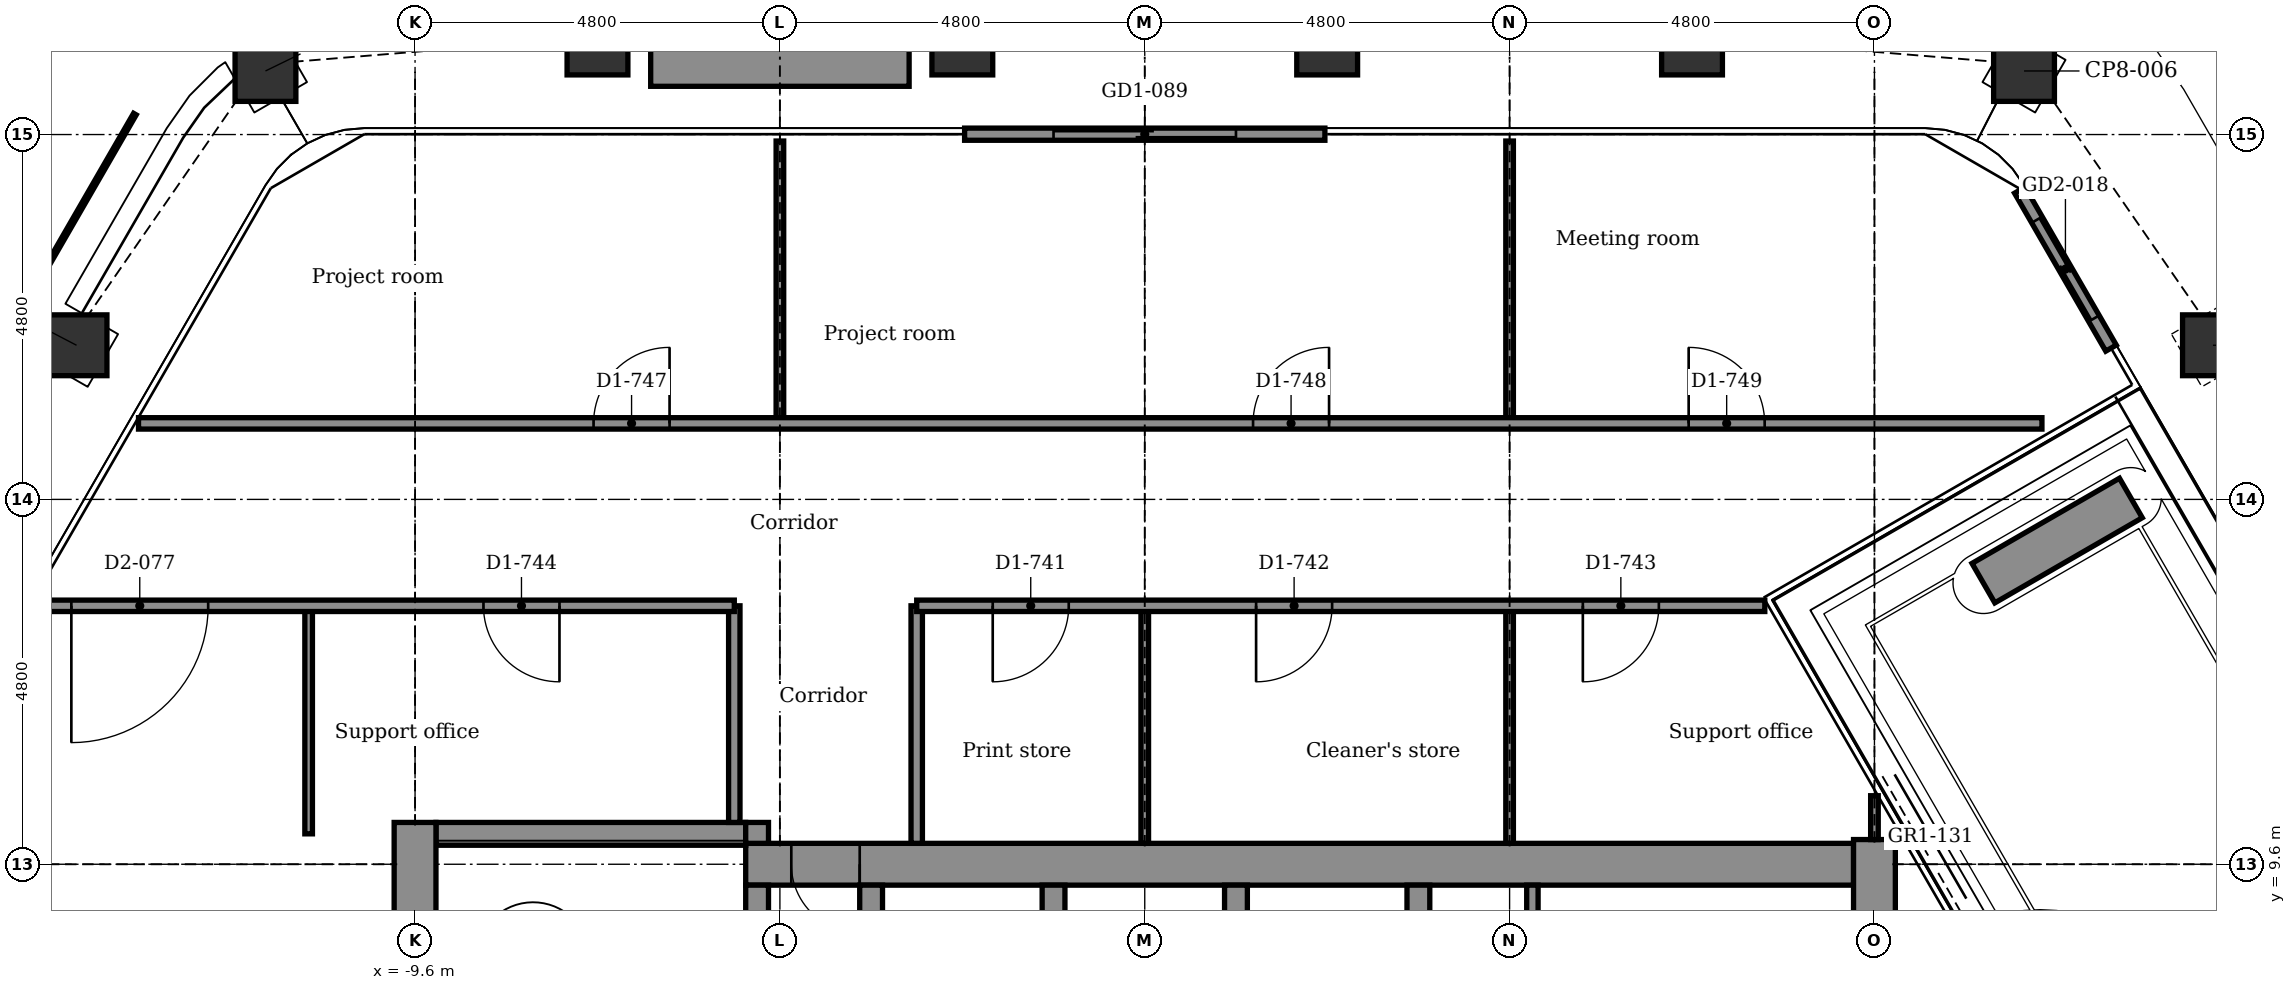
"""IFC4 building model, lengths in metres.
Left out: names, types, materials, properties, quantities, classifications, styles, units other than length and angle.
Written with IfcOpenShell. Run it as: python <this file> out.ifc"""

import sys

from ifc_helpers import new_model, si_unit, direction, frame, frame_2d, origin, origin_2d, place, context, subcontext, project, spatial, rectangle, extrude, element, fill, save


model = new_model("IFC4")
c1 = context("Model", 3, precision=1e-05, world=origin(), true_north=direction((0.0, 1.0)))
c2 = subcontext(c1, "Body", "Model", "MODEL_VIEW")
j1 = project(units=[si_unit("LENGTHUNIT", "METRE"), si_unit("PLANEANGLEUNIT", "RADIAN")], contexts=[c1])
p1 = place(None, origin())
s1 = spatial("IfcSite", under=j1, at=p1, CompositionType="ELEMENT")
p2 = place(p1, origin())
s2 = spatial("IfcBuilding", under=s1, at=p2, CompositionType="ELEMENT")
p3 = place(p2, frame((0.0, 0.0, 285.2)))
s3 = spatial("IfcBuildingStorey", under=s2, at=p3, CompositionType="ELEMENT", Elevation=285.2)
for number, where, z_axis, x_axis in (
    (1, (-11.568, 20.036, -0.15), (0.0, 0.0, 1.0), (0.866, 0.5, 0.0)),
    (2, (-7.2, 20.385, -0.15), (0.0, 0.0, 1.0), (1.0, 0.0, 0.0)),
    (3, (-2.4, 20.385, -0.15), (0.0, 0.0, 1.0), (1.0, 0.0, 0.0)),
    (4, (2.4, 20.385, -0.15), (0.0, 0.0, 1.0), (1.0, 0.0, 0.0)),
    (5, (7.2, 20.385, -0.15), (0.0, 0.0, 1.0), (1.0, 0.0, 0.0)),
    (6, (11.568, 20.036, -0.15), (0.0, 0.0, 1.0), (0.5, 0.866, 0.0)),
    (7, (14.054, 16.428, -0.15), (0.0, 0.0, 1.0), (0.866, 0.5, 0.0)),
    (8, (-14.054, 16.428, -0.15), (0.0, 0.0, 1.0), (0.5, 0.866, 0.0)),
):
    element("IfcColumn", number, at=place(p3, frame(where, z_axis=z_axis, x_axis=x_axis)), inside=s3, PredefinedType="COLUMN", context=c2, shape_type="SweptSolid", body=[
        extrude(rectangle(XDim=0.8, YDim=0.8, at=origin_2d()), origin(), (0.0, 0.0, 1.0), 3.9),
    ])
p4 = place(p3, frame((-5.25, 9.6, -0.15), z_axis=(0.0, 0.0, 1.0), x_axis=(1.0, 0.0, 0.0)))
e9 = element("IfcWall", 9, at=p4, inside=s3, PredefinedType="SHEAR", context=c2, shape_type="SweptSolid", body=[
    extrude(rectangle(XDim=14.575, YDim=0.55, at=frame_2d((7.288, 0.0))), origin(), (0.0, 0.0, 1.0), 3.9),
])
p5 = place(p4, frame((0.6, 0.0, 0.15)))
e10 = element("IfcOpeningElement", 10, at=p5, cuts=e9, PredefinedType="OPENING", context=c2, shape_type="SweptSolid", body=[
    extrude(rectangle(XDim=0.9, YDim=2.1, at=frame_2d((0.45, 1.05))), frame((0.0, 0.285, 0.0), z_axis=(0.0, -1.0, 0.0), x_axis=(1.0, 0.0, 0.0)), (0.0, 0.0, 1.0), 0.57),
])
p6 = place(p3, frame((-9.325, 10.0, -0.15), z_axis=(0.0, 0.0, 1.0), x_axis=(1.0, 0.0, 0.0)))
e11 = element("IfcWall", 11, at=p6, inside=s3, PredefinedType="STANDARD", context=c2, shape_type="SweptSolid", body=[
    extrude(rectangle(XDim=4.075, YDim=0.3, at=frame_2d((2.038, 0.0))), origin(), (0.0, 0.0, 1.0), 3.9),
])
p7 = place(p3, frame((-9.6, 2.55, -0.15), z_axis=(0.0, 0.0, 1.0), x_axis=(0.0, 1.0, 0.0)))
e12 = element("IfcWall", 12, at=p7, inside=s3, PredefinedType="SHEAR", context=c2, shape_type="SweptSolid", body=[
    extrude(rectangle(XDim=7.6, YDim=0.55, at=frame_2d((3.8, 0.0))), origin(), (0.0, 0.0, 1.0), 3.9),
])
p8 = place(p3, frame((-5.1, 2.25, -0.15), z_axis=(0.0, 0.0, 1.0), x_axis=(0.0, 1.0, 0.0)))
e13 = element("IfcWall", 13, at=p8, inside=s3, PredefinedType="STANDARD", context=c2, shape_type="SweptSolid", body=[
    extrude(rectangle(XDim=7.075, YDim=0.3, at=frame_2d((3.538, 0.0))), origin(), (0.0, 0.0, 1.0), 3.9),
])
p9 = place(p8, frame((2.0, 0.0, 0.15)))
e14 = element("IfcOpeningElement", 14, at=p9, cuts=e13, PredefinedType="OPENING", context=c2, shape_type="SweptSolid", body=[
    extrude(rectangle(XDim=1.2, YDim=2.1, at=frame_2d((0.6, 1.05))), frame((0.0, 0.16, 0.0), z_axis=(0.0, -1.0, 0.0), x_axis=(1.0, 0.0, 0.0)), (0.0, 0.0, 1.0), 0.32),
])
p10 = place(p3, frame((-5.1, 9.875, -0.15), z_axis=(0.0, 0.0, 1.0), x_axis=(0.0, 1.0, 0.0)))
e15 = element("IfcWall", 15, at=p10, inside=s3, PredefinedType="STANDARD", context=c2, shape_type="SweptSolid", body=[
    extrude(rectangle(XDim=0.275, YDim=0.3, at=frame_2d((0.137, 0.0))), origin(), (0.0, 0.0, 1.0), 3.9),
])
for number, where, z_axis, x_axis in (
    (16, (-3.6, 5.85, -0.15), (0.0, 0.0, 1.0), (0.0, 1.0, 0.0)),
    (17, (-1.2, 5.85, -0.15), (0.0, 0.0, 1.0), (0.0, 1.0, 0.0)),
    (18, (1.2, 5.85, -0.15), (0.0, 0.0, 1.0), (0.0, 1.0, 0.0)),
    (19, (3.6, 5.85, -0.15), (0.0, 0.0, 1.0), (0.0, 1.0, 0.0)),
):
    element("IfcWall", number, at=place(p3, frame(where, z_axis=z_axis, x_axis=x_axis)), inside=s3, PredefinedType="STANDARD", context=c2, shape_type="SweptSolid", body=[
        extrude(rectangle(XDim=3.475, YDim=0.3, at=frame_2d((1.737, 0.0))), origin(), (0.0, 0.0, 1.0), 3.9),
    ])
p11 = place(p3, frame((9.6, -10.15, -0.15), z_axis=(0.0, 0.0, 1.0), x_axis=(0.0, 1.0, 0.0)))
e20 = element("IfcWall", 20, at=p11, inside=s3, PredefinedType="SHEAR", context=c2, shape_type="SweptSolid", body=[
    extrude(rectangle(XDim=20.075, YDim=0.55, at=frame_2d((10.038, 0.0))), origin(), (0.0, 0.0, 1.0), 3.9),
])
p12 = place(p3, frame((-2.37, 19.205, 0.0), z_axis=(0.0, 0.0, 1.0), x_axis=(1.0, 0.0, 0.0)))
e21 = element("IfcWall", 21, at=p12, inside=s3, PredefinedType="PARTITIONING", context=c2, shape_type="SweptSolid", body=[
    extrude(rectangle(XDim=4.74, YDim=0.16, at=frame_2d((2.37, 0.0))), origin(), (0.0, 0.0, 1.0), 3.75),
])
p13 = place(p12, frame((1.17, 0.0, 0.0)))
e22 = element("IfcOpeningElement", 22, at=p13, cuts=e21, PredefinedType="OPENING", context=c2, shape_type="SweptSolid", body=[
    extrude(rectangle(XDim=2.4, YDim=2.4, at=frame_2d((1.2, 1.2))), frame((0.0, 0.09, 0.0), z_axis=(0.0, -1.0, 0.0), x_axis=(1.0, 0.0, 0.0)), (0.0, 0.0, 1.0), 0.18),
])
p14 = place(p3, frame((11.513, 18.469, 0.0), z_axis=(0.0, 0.0, 1.0), x_axis=(0.499957262057, -0.866050077142, 0.0)))
e23 = element("IfcWall", 23, at=p14, inside=s3, PredefinedType="PARTITIONING", context=c2, shape_type="SweptSolid", body=[
    extrude(rectangle(XDim=2.4, YDim=0.16, at=frame_2d((1.2, 0.0))), origin(), (0.0, 0.0, 1.0), 3.75),
])
p15 = place(p14, frame((0.45, 0.0, 0.0)))
e24 = element("IfcOpeningElement", 24, at=p15, cuts=e23, PredefinedType="OPENING", context=c2, shape_type="SweptSolid", body=[
    extrude(rectangle(XDim=1.5, YDim=2.4, at=frame_2d((0.75, 1.2))), frame((0.0, 0.09, 0.0), z_axis=(0.0, -1.0, 0.0), x_axis=(1.0, 0.0, 0.0)), (0.0, 0.0, 1.0), 0.18),
])
p16 = place(p3, frame((-6.5, 20.135, 0.0), z_axis=(0.0, 0.0, 1.0), x_axis=(1.0, 0.0, 0.0)))
e25 = element("IfcWall", 25, at=p16, inside=s3, PredefinedType="USERDEFINED", context=c2, shape_type="SweptSolid", body=[
    extrude(rectangle(XDim=3.4, YDim=0.6, at=frame_2d((1.7, 0.0))), origin(), (0.0, 0.0, 1.0), 0.7),
])
p17 = place(p3, frame((11.034, 13.298, 0.0), z_axis=(0.0, 0.0, 1.0), x_axis=(0.865980463445, 0.500077830873, 0.0)))
e26 = element("IfcWall", 26, at=p17, inside=s3, PredefinedType="USERDEFINED", context=c2, shape_type="SweptSolid", body=[
    extrude(rectangle(XDim=2.24, YDim=0.6, at=frame_2d((1.12, 0.0))), origin(), (0.0, 0.0, 1.0), 0.7),
])
p18 = place(p3, frame((9.6, 9.925, 0.0), z_axis=(0.0, 0.0, 1.0), x_axis=(0.0, 1.0, 0.0)))
e27 = element("IfcWall", 27, at=p18, inside=s3, PredefinedType="PARTITIONING", context=c2, shape_type="SweptSolid", body=[
    extrude(rectangle(XDim=0.576, YDim=0.1, at=frame_2d((0.288, 0.0))), origin(), (0.0, 0.0, 1.0), 3.217),
])
p19 = place(p3, frame((5.1, 6.0, 0.0), z_axis=(0.0, 0.0, 1.0), x_axis=(0.0, 1.0, 0.0)))
e28 = element("IfcWall", 28, at=p19, inside=s3, PredefinedType="PARTITIONING", context=c2, shape_type="SweptSolid", body=[
    extrude(rectangle(XDim=3.325, YDim=0.15, at=frame_2d((1.663, 0.0))), origin(), (0.0, 0.0, 1.0), 3.75),
])
p20 = place(p19, frame((1.4, 0.0, 0.0)))
e29 = element("IfcOpeningElement", 29, at=p20, cuts=e28, PredefinedType="OPENING", context=c2, shape_type="SweptSolid", body=[
    extrude(rectangle(XDim=0.8, YDim=2.1, at=frame_2d((0.4, 1.05))), frame((0.0, 0.085, 0.0), z_axis=(0.0, -1.0, 0.0), x_axis=(1.0, 0.0, 0.0)), (0.0, 0.0, 1.0), 0.17),
])
p21 = place(p3, frame((4.8, 9.875, 0.0), z_axis=(0.0, 0.0, 1.0), x_axis=(0.0, 1.0, 0.0)))
e30 = element("IfcWall", 30, at=p21, inside=s3, PredefinedType="PARTITIONING", context=c2, shape_type="SweptSolid", body=[
    extrude(rectangle(XDim=3.125, YDim=0.1, at=frame_2d((1.562, 0.0))), origin(), (0.0, 0.0, 1.0), 3.217),
])
p22 = place(p3, frame((4.8, 15.4, 0.0), z_axis=(0.0, 0.0, 1.0), x_axis=(0.0, 1.0, 0.0)))
e31 = element("IfcWall", 31, at=p22, inside=s3, PredefinedType="PARTITIONING", context=c2, shape_type="SweptSolid", body=[
    extrude(rectangle(XDim=3.715, YDim=0.1, at=frame_2d((1.857, 0.0))), origin(), (0.0, 0.0, 1.0), 3.217),
])
p23 = place(p3, frame((0.0, 9.875, 0.0), z_axis=(0.0, 0.0, 1.0), x_axis=(0.0, 1.0, 0.0)))
e32 = element("IfcWall", 32, at=p23, inside=s3, PredefinedType="PARTITIONING", context=c2, shape_type="SweptSolid", body=[
    extrude(rectangle(XDim=3.125, YDim=0.1, at=frame_2d((1.562, 0.0))), origin(), (0.0, 0.0, 1.0), 3.217),
])
p24 = place(p3, frame((-3.0, 9.875, 0.0), z_axis=(0.0, 0.0, 1.0), x_axis=(0.0, 1.0, 0.0)))
e33 = element("IfcWall", 33, at=p24, inside=s3, PredefinedType="PARTITIONING", context=c2, shape_type="SweptSolid", body=[
    extrude(rectangle(XDim=3.125, YDim=0.15, at=frame_2d((1.562, 0.0))), origin(), (0.0, 0.0, 1.0), 3.75),
])
p25 = place(p3, frame((-4.8, 15.4, 0.0), z_axis=(0.0, 0.0, 1.0), x_axis=(0.0, 1.0, 0.0)))
e34 = element("IfcWall", 34, at=p25, inside=s3, PredefinedType="PARTITIONING", context=c2, shape_type="SweptSolid", body=[
    extrude(rectangle(XDim=3.715, YDim=0.1, at=frame_2d((1.857, 0.0))), origin(), (0.0, 0.0, 1.0), 3.217),
])
p26 = place(p3, frame((-5.4, 10.15, 0.0), z_axis=(0.0, 0.0, 1.0), x_axis=(0.0, 1.0, 0.0)))
e35 = element("IfcWall", 35, at=p26, inside=s3, PredefinedType="PARTITIONING", context=c2, shape_type="SweptSolid", body=[
    extrude(rectangle(XDim=2.85, YDim=0.15, at=frame_2d((1.425, 0.0))), origin(), (0.0, 0.0, 1.0), 3.75),
])
p27 = place(p3, frame((-11.0, 10.0, 0.0), z_axis=(0.0, 0.0, 1.0), x_axis=(0.0, 1.0, 0.0)))
e36 = element("IfcWall", 36, at=p27, inside=s3, PredefinedType="PARTITIONING", context=c2, shape_type="SweptSolid", body=[
    extrude(rectangle(XDim=3.0, YDim=0.1, at=frame_2d((1.5, 0.0))), origin(), (0.0, 0.0, 1.0), 3.75),
])
p28 = place(p3, frame((-14.624, 13.0, 0.0), z_axis=(0.0, 0.0, 1.0), x_axis=(1.0, 0.0, 0.0)))
e37 = element("IfcWall", 37, at=p28, inside=s3, PredefinedType="PARTITIONING", context=c2, shape_type="SweptSolid", body=[
    extrude(rectangle(XDim=9.224, YDim=0.15, at=frame_2d((4.612, 0.0))), origin(), (0.0, 0.0, 1.0), 3.75),
])
p29 = place(p28, frame((5.924, 0.0, 0.0)))
e38 = element("IfcOpeningElement", 38, at=p29, cuts=e37, PredefinedType="OPENING", context=c2, shape_type="SweptSolid", body=[
    extrude(rectangle(XDim=1.0, YDim=2.1, at=frame_2d((0.5, 1.05))), frame((0.0, 0.085, 0.0), z_axis=(0.0, -1.0, 0.0), x_axis=(1.0, 0.0, 0.0)), (0.0, 0.0, 1.0), 0.17),
])
p30 = place(p28, frame((0.502, 0.0, 0.0)))
e39 = element("IfcOpeningElement", 39, at=p30, cuts=e37, PredefinedType="OPENING", context=c2, shape_type="SweptSolid", body=[
    extrude(rectangle(XDim=1.8, YDim=2.1, at=frame_2d((0.9, 1.05))), frame((0.0, 0.085, 0.0), z_axis=(0.0, -1.0, 0.0), x_axis=(1.0, 0.0, 0.0)), (0.0, 0.0, 1.0), 0.17),
])
p31 = place(p3, frame((-3.0, 13.0, 0.0), z_axis=(0.0, 0.0, 1.0), x_axis=(1.0, 0.0, 0.0)))
e40 = element("IfcWall", 40, at=p31, inside=s3, PredefinedType="PARTITIONING", context=c2, shape_type="SweptSolid", body=[
    extrude(rectangle(XDim=11.157, YDim=0.15, at=frame_2d((5.579, 0.0))), origin(), (0.0, 0.0, 1.0), 3.75),
])
p32 = place(p31, frame((1.0, 0.0, 0.0)))
e41 = element("IfcOpeningElement", 41, at=p32, cuts=e40, PredefinedType="OPENING", context=c2, shape_type="SweptSolid", body=[
    extrude(rectangle(XDim=1.0, YDim=2.1, at=frame_2d((0.5, 1.05))), frame((0.0, 0.085, 0.0), z_axis=(0.0, -1.0, 0.0), x_axis=(1.0, 0.0, 0.0)), (0.0, 0.0, 1.0), 0.17),
])
p33 = place(p31, frame((4.465, 0.0, 0.0)))
e42 = element("IfcOpeningElement", 42, at=p33, cuts=e40, PredefinedType="OPENING", context=c2, shape_type="SweptSolid", body=[
    extrude(rectangle(XDim=1.0, YDim=2.1, at=frame_2d((0.5, 1.05))), frame((0.0, 0.085, 0.0), z_axis=(0.0, -1.0, 0.0), x_axis=(1.0, 0.0, 0.0)), (0.0, 0.0, 1.0), 0.17),
])
p34 = place(p31, frame((8.764, 0.0, 0.0)))
e43 = element("IfcOpeningElement", 43, at=p34, cuts=e40, PredefinedType="OPENING", context=c2, shape_type="SweptSolid", body=[
    extrude(rectangle(XDim=1.0, YDim=2.1, at=frame_2d((0.5, 1.05))), frame((0.0, 0.085, 0.0), z_axis=(0.0, -1.0, 0.0), x_axis=(1.0, 0.0, 0.0)), (0.0, 0.0, 1.0), 0.17),
])
p35 = place(p3, frame((-13.238, 15.4, 0.0), z_axis=(0.0, 0.0, 1.0), x_axis=(1.0, 0.0, 0.0)))
e44 = element("IfcWall", 44, at=p35, inside=s3, PredefinedType="PARTITIONING", context=c2, shape_type="SweptSolid", body=[
    extrude(rectangle(XDim=25.042, YDim=0.15, at=frame_2d((12.521, 0.0))), origin(), (0.0, 0.0, 1.0), 3.75),
])
p36 = place(p35, frame((5.987, 0.0, 0.0)))
e45 = element("IfcOpeningElement", 45, at=p36, cuts=e44, PredefinedType="OPENING", context=c2, shape_type="SweptSolid", body=[
    extrude(rectangle(XDim=1.0, YDim=2.1, at=frame_2d((0.5, 1.05))), frame((0.0, 0.085, 0.0), z_axis=(0.0, -1.0, 0.0), x_axis=(1.0, 0.0, 0.0)), (0.0, 0.0, 1.0), 0.17),
])
p37 = place(p35, frame((14.663, 0.0, 0.0)))
e46 = element("IfcOpeningElement", 46, at=p37, cuts=e44, PredefinedType="OPENING", context=c2, shape_type="SweptSolid", body=[
    extrude(rectangle(XDim=1.0, YDim=2.1, at=frame_2d((0.5, 1.05))), frame((0.0, 0.085, 0.0), z_axis=(0.0, -1.0, 0.0), x_axis=(1.0, 0.0, 0.0)), (0.0, 0.0, 1.0), 0.17),
])
p38 = place(p35, frame((20.394, 0.0, 0.0)))
e47 = element("IfcOpeningElement", 47, at=p38, cuts=e44, PredefinedType="OPENING", context=c2, shape_type="SweptSolid", body=[
    extrude(rectangle(XDim=1.0, YDim=2.1, at=frame_2d((0.5, 1.05))), frame((0.0, 0.085, 0.0), z_axis=(0.0, -1.0, 0.0), x_axis=(1.0, 0.0, 0.0)), (0.0, 0.0, 1.0), 0.17),
])
p39 = place(p13, origin())
e48 = element("IfcDoor", 48, at=p39, inside=s3, OperationType="DOUBLE_DOOR_SLIDING", PredefinedType="DOOR", context=c2, shape_type="SweptSolid", body=[
    extrude(rectangle(XDim=2.4, YDim=2.4, at=frame_2d((1.2, 1.2))), frame((0.0, 0.025, 0.0), z_axis=(0.0, -1.0, 0.0), x_axis=(1.0, 0.0, 0.0)), (0.0, 0.0, 1.0), 0.05),
])
fill(e22, e48)
p40 = place(p15, origin())
e49 = element("IfcDoor", 49, at=p40, inside=s3, OperationType="DOUBLE_DOOR_SLIDING", PredefinedType="DOOR", context=c2, shape_type="SweptSolid", body=[
    extrude(rectangle(XDim=1.5, YDim=2.4, at=frame_2d((0.75, 1.2))), frame((0.0, 0.025, 0.0), z_axis=(0.0, -1.0, 0.0), x_axis=(1.0, 0.0, 0.0)), (0.0, 0.0, 1.0), 0.05),
])
fill(e24, e49)
p41 = place(p32, frame((1.0, 0.0, 0.0), z_axis=(0.0, 0.0, 1.0), x_axis=(-1.0, 0.0, 0.0)))
e50 = element("IfcDoor", 50, at=p41, inside=s3, OperationType="SINGLE_SWING_LEFT", PredefinedType="DOOR", context=c2, shape_type="SweptSolid", body=[
    extrude(rectangle(XDim=1.0, YDim=2.1, at=frame_2d((0.5, 1.05))), frame((0.0, 0.025, 0.0), z_axis=(0.0, -1.0, 0.0), x_axis=(1.0, 0.0, 0.0)), (0.0, 0.0, 1.0), 0.05),
])
fill(e41, e50)
p42 = place(p33, frame((1.0, 0.0, 0.0), z_axis=(0.0, 0.0, 1.0), x_axis=(-1.0, 0.0, 0.0)))
e51 = element("IfcDoor", 51, at=p42, inside=s3, OperationType="SINGLE_SWING_LEFT", PredefinedType="DOOR", context=c2, shape_type="SweptSolid", body=[
    extrude(rectangle(XDim=1.0, YDim=2.1, at=frame_2d((0.5, 1.05))), frame((0.0, 0.025, 0.0), z_axis=(0.0, -1.0, 0.0), x_axis=(1.0, 0.0, 0.0)), (0.0, 0.0, 1.0), 0.05),
])
fill(e42, e51)
p43 = place(p34, frame((1.0, 0.0, 0.0), z_axis=(0.0, 0.0, 1.0), x_axis=(-1.0, 0.0, 0.0)))
e52 = element("IfcDoor", 52, at=p43, inside=s3, OperationType="SINGLE_SWING_LEFT", PredefinedType="DOOR", context=c2, shape_type="SweptSolid", body=[
    extrude(rectangle(XDim=1.0, YDim=2.1, at=frame_2d((0.5, 1.05))), frame((0.0, 0.025, 0.0), z_axis=(0.0, -1.0, 0.0), x_axis=(1.0, 0.0, 0.0)), (0.0, 0.0, 1.0), 0.05),
])
fill(e43, e52)
p44 = place(p29, frame((1.0, 0.0, 0.0), z_axis=(0.0, 0.0, 1.0), x_axis=(-1.0, 0.0, 0.0)))
e53 = element("IfcDoor", 53, at=p44, inside=s3, OperationType="SINGLE_SWING_RIGHT", PredefinedType="DOOR", context=c2, shape_type="SweptSolid", body=[
    extrude(rectangle(XDim=1.0, YDim=2.1, at=frame_2d((0.5, 1.05))), frame((0.0, 0.025, 0.0), z_axis=(0.0, -1.0, 0.0), x_axis=(1.0, 0.0, 0.0)), (0.0, 0.0, 1.0), 0.05),
])
fill(e38, e53)
p45 = place(p36, origin())
e54 = element("IfcDoor", 54, at=p45, inside=s3, OperationType="SINGLE_SWING_RIGHT", PredefinedType="DOOR", context=c2, shape_type="SweptSolid", body=[
    extrude(rectangle(XDim=1.0, YDim=2.1, at=frame_2d((0.5, 1.05))), frame((0.0, 0.025, 0.0), z_axis=(0.0, -1.0, 0.0), x_axis=(1.0, 0.0, 0.0)), (0.0, 0.0, 1.0), 0.05),
])
fill(e45, e54)
p46 = place(p37, origin())
e55 = element("IfcDoor", 55, at=p46, inside=s3, OperationType="SINGLE_SWING_RIGHT", PredefinedType="DOOR", context=c2, shape_type="SweptSolid", body=[
    extrude(rectangle(XDim=1.0, YDim=2.1, at=frame_2d((0.5, 1.05))), frame((0.0, 0.025, 0.0), z_axis=(0.0, -1.0, 0.0), x_axis=(1.0, 0.0, 0.0)), (0.0, 0.0, 1.0), 0.05),
])
fill(e46, e55)
p47 = place(p38, origin())
e56 = element("IfcDoor", 56, at=p47, inside=s3, OperationType="SINGLE_SWING_LEFT", PredefinedType="DOOR", context=c2, shape_type="SweptSolid", body=[
    extrude(rectangle(XDim=1.0, YDim=2.1, at=frame_2d((0.5, 1.05))), frame((0.0, 0.025, 0.0), z_axis=(0.0, -1.0, 0.0), x_axis=(1.0, 0.0, 0.0)), (0.0, 0.0, 1.0), 0.05),
])
fill(e47, e56)
p48 = place(p30, frame((1.8, 0.0, 0.0), z_axis=(0.0, 0.0, 1.0), x_axis=(-1.0, 0.0, 0.0)))
e57 = element("IfcDoor", 57, at=p48, inside=s3, OperationType="SINGLE_SWING_LEFT", PredefinedType="DOOR", context=c2, shape_type="SweptSolid", body=[
    extrude(rectangle(XDim=1.8, YDim=2.1, at=frame_2d((0.9, 1.05))), frame((0.0, 0.025, 0.0), z_axis=(0.0, -1.0, 0.0), x_axis=(1.0, 0.0, 0.0)), (0.0, 0.0, 1.0), 0.05),
])
fill(e39, e57)
p49 = place(p5, frame((0.9, 0.0, 0.0), z_axis=(0.0, 0.0, 1.0), x_axis=(-1.0, 0.0, 0.0)))
e58 = element("IfcDoor", 58, at=p49, inside=s3, OperationType="SINGLE_SWING_RIGHT", PredefinedType="DOOR", context=c2, shape_type="SweptSolid", body=[
    extrude(rectangle(XDim=0.9, YDim=2.1, at=frame_2d((0.45, 1.05))), frame((0.0, 0.025, 0.0), z_axis=(0.0, -1.0, 0.0), x_axis=(1.0, 0.0, 0.0)), (0.0, 0.0, 1.0), 0.05),
])
fill(e10, e58)
save(model, sys.argv[1])
